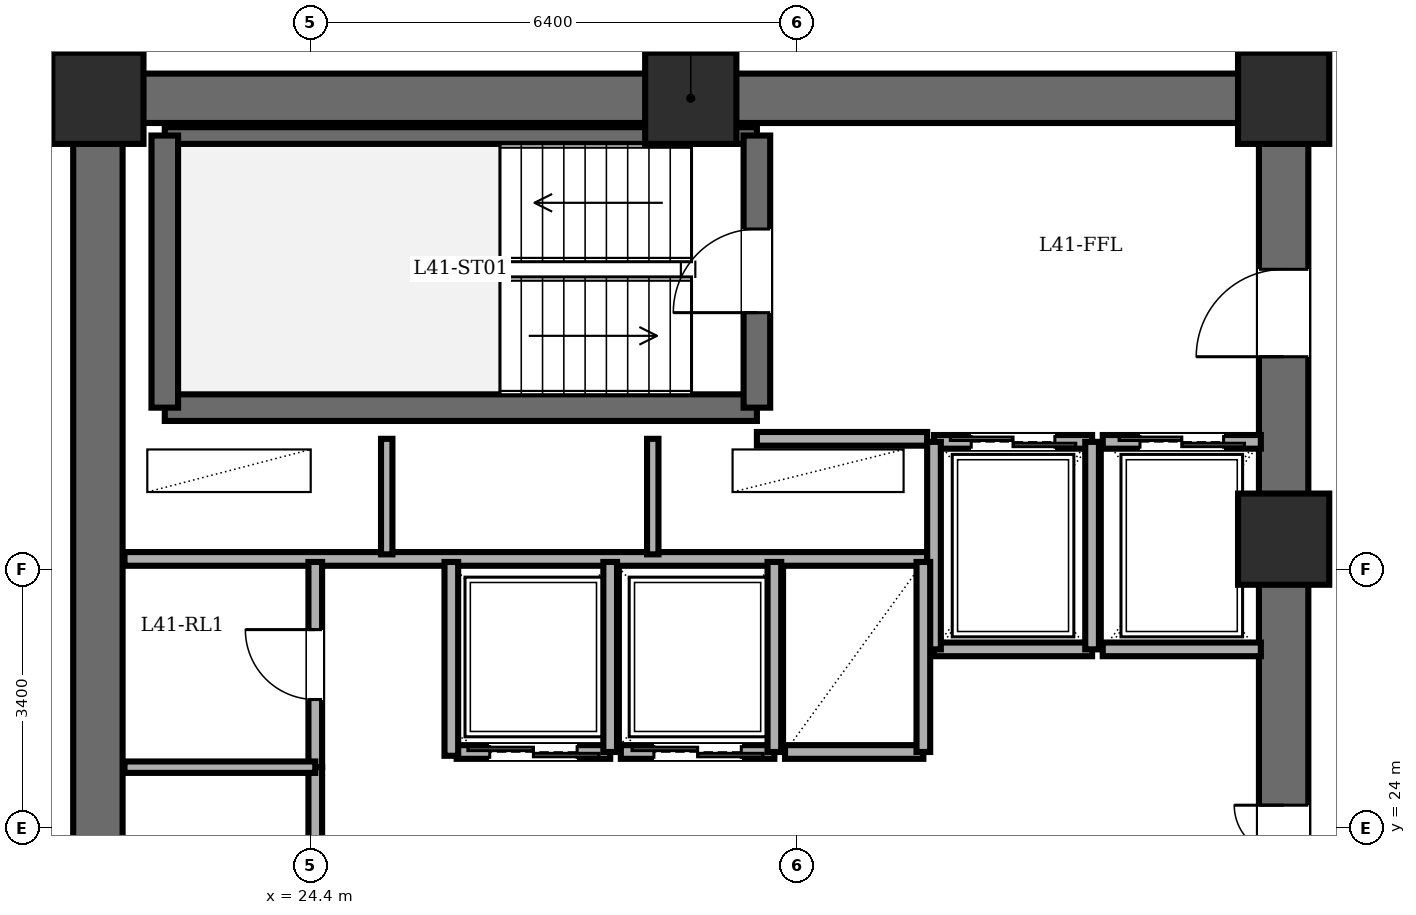
"""IFC4 building model, lengths in metres.
Left out: names, types, materials, properties, quantities, classifications, styles, units other than length and angle.
Written with IfcOpenShell. Run it as: python <this file> out.ifc"""

import sys

from ifc_helpers import new_model, si_unit, direction, frame, frame_2d, origin, origin_2d, place, context, subcontext, project, spatial, rectangle, extrude, element, fill, save


model = new_model("IFC4")
c1 = context("Model", 3, precision=1e-05, world=origin(), true_north=direction((0.0, 1.0)))
c2 = subcontext(c1, "Body", "Model", "MODEL_VIEW")
j1 = project(units=[si_unit("LENGTHUNIT", "METRE"), si_unit("PLANEANGLEUNIT", "RADIAN")], contexts=[c1])
p1 = place(None, origin())
s1 = spatial("IfcSite", under=j1, at=p1, CompositionType="ELEMENT")
p2 = place(p1, origin())
s2 = spatial("IfcBuilding", under=s1, at=p2, CompositionType="ELEMENT")
p3 = place(p2, frame((0.0, 0.0, 158.2)))
s3 = spatial("IfcBuildingStorey", under=s2, at=p3, CompositionType="ELEMENT", Elevation=158.2)
for number, where, z_axis, x_axis in (
    (1, (37.2, 27.8, 0.0), (0.0, 0.0, 1.0), (1.0, 0.0, 0.0)),
    (2, (37.2, 33.6, 0.0), (0.0, 0.0, 1.0), (1.0, 0.0, 0.0)),
    (3, (29.4, 33.6, 0.0), (0.0, 0.0, 1.0), (1.0, 0.0, 0.0)),
    (4, (21.6, 33.6, 0.0), (0.0, 0.0, 1.0), (1.0, 0.0, 0.0)),
):
    element("IfcColumn", number, at=place(p3, frame(where, z_axis=z_axis, x_axis=x_axis)), inside=s3, PredefinedType="COLUMN", context=c2, shape_type="SweptSolid", body=[
        extrude(rectangle(XDim=1.2, YDim=1.2, at=origin_2d()), origin(), (0.0, 0.0, 1.0), 3.6),
    ])
p4 = place(p3, frame((21.6, 14.4, 0.0), z_axis=(0.0, 0.0, 1.0), x_axis=(0.0, 1.0, 0.0)))
e5 = element("IfcWall", 5, at=p4, inside=s3, PredefinedType="SHEAR", context=c2, shape_type="SweptSolid", body=[
    extrude(rectangle(XDim=19.2, YDim=0.65, at=frame_2d((9.6, 0.0))), origin(), (0.0, 0.0, 1.0), 3.4),
])
p5 = place(p3, frame((21.6, 33.6, 0.0), z_axis=(0.0, 0.0, 1.0), x_axis=(1.0, 0.0, 0.0)))
e6 = element("IfcWall", 6, at=p5, inside=s3, PredefinedType="SHEAR", context=c2, shape_type="SweptSolid", body=[
    extrude(rectangle(XDim=15.6, YDim=0.65, at=frame_2d((7.8, 0.0))), origin(), (0.0, 0.0, 1.0), 3.4),
])
p6 = place(p3, frame((37.2, 14.4, 0.0), z_axis=(0.0, 0.0, 1.0), x_axis=(0.0, 1.0, 0.0)))
e7 = element("IfcWall", 7, at=p6, inside=s3, PredefinedType="SHEAR", context=c2, shape_type="SweptSolid", body=[
    extrude(rectangle(XDim=19.2, YDim=0.65, at=frame_2d((9.6, 0.0))), origin(), (0.0, 0.0, 1.0), 3.4),
])
p7 = place(p6, frame((15.8, 0.0, 0.0)))
e8 = element("IfcOpeningElement", 8, at=p7, cuts=e7, PredefinedType="OPENING", context=c2, shape_type="SweptSolid", body=[
    extrude(rectangle(XDim=1.15, YDim=2.15, at=frame_2d((0.575, 1.075))), frame((0.0, 0.335, 0.0), z_axis=(0.0, -1.0, 0.0), x_axis=(1.0, 0.0, 0.0)), (0.0, 0.0, 1.0), 0.67),
])
p8 = place(p6, frame((3.6, 0.0, 0.0)))
e9 = element("IfcOpeningElement", 9, at=p8, cuts=e7, PredefinedType="OPENING", context=c2, shape_type="SweptSolid", body=[
    extrude(rectangle(XDim=1.1, YDim=2.15, at=frame_2d((0.55, 1.075))), frame((0.0, 0.335, 0.0), z_axis=(0.0, -1.0, 0.0), x_axis=(1.0, 0.0, 0.0)), (0.0, 0.0, 1.0), 0.67),
])
p9 = place(p6, frame((8.6, 0.0, 0.0)))
e10 = element("IfcOpeningElement", 10, at=p9, cuts=e7, PredefinedType="OPENING", context=c2, shape_type="SweptSolid", body=[
    extrude(rectangle(XDim=1.3, YDim=2.2, at=frame_2d((0.65, 1.1))), frame((0.0, 0.335, 0.0), z_axis=(0.0, -1.0, 0.0), x_axis=(1.0, 0.0, 0.0)), (0.0, 0.0, 1.0), 0.67),
])
p10 = place(p3, frame((22.48, 29.53, 0.0), z_axis=(0.0, 0.0, 1.0), x_axis=(1.0, 0.0, 0.0)))
e11 = element("IfcWall", 11, at=p10, inside=s3, PredefinedType="SOLIDWALL", context=c2, shape_type="SweptSolid", body=[
    extrude(rectangle(XDim=7.79, YDim=0.35, at=frame_2d((3.895, 0.0))), origin(), (0.0, 0.0, 1.0), 3.4),
])
p11 = place(p3, frame((22.48, 33.11, 0.0), z_axis=(0.0, 0.0, 1.0), x_axis=(1.0, 0.0, 0.0)))
e12 = element("IfcWall", 12, at=p11, inside=s3, PredefinedType="PARTITIONING", context=c2, shape_type="SweptSolid", body=[
    extrude(rectangle(XDim=7.79, YDim=0.22, at=frame_2d((3.895, 0.0))), origin(), (0.0, 0.0, 1.0), 3.4),
])
p12 = place(p3, frame((22.48, 29.53, 0.0), z_axis=(0.0, 0.0, 1.0), x_axis=(0.0, 1.0, 0.0)))
e13 = element("IfcWall", 13, at=p12, inside=s3, PredefinedType="SOLIDWALL", context=c2, shape_type="SweptSolid", body=[
    extrude(rectangle(XDim=3.58, YDim=0.35, at=frame_2d((1.79, 0.0))), origin(), (0.0, 0.0, 1.0), 3.4),
])
p13 = place(p3, frame((30.27, 29.53, 0.0), z_axis=(0.0, 0.0, 1.0), x_axis=(0.0, 1.0, 0.0)))
e14 = element("IfcWall", 14, at=p13, inside=s3, PredefinedType="SOLIDWALL", context=c2, shape_type="SweptSolid", body=[
    extrude(rectangle(XDim=3.58, YDim=0.35, at=frame_2d((1.79, 0.0))), origin(), (0.0, 0.0, 1.0), 3.4),
])
p14 = place(p13, frame((1.25, 0.0, 0.0)))
e15 = element("IfcOpeningElement", 15, at=p14, cuts=e14, PredefinedType="OPENING", context=c2, shape_type="SweptSolid", body=[
    extrude(rectangle(XDim=1.1, YDim=2.15, at=frame_2d((0.55, 1.075))), frame((0.0, 0.185, 0.0), z_axis=(0.0, -1.0, 0.0), x_axis=(1.0, 0.0, 0.0)), (0.0, 0.0, 1.0), 0.37),
])
p15 = place(p3, frame((30.27, 29.12, 0.0), z_axis=(0.0, 0.0, 1.0), x_axis=(1.0, 0.0, 0.0)))
e16 = element("IfcWall", 16, at=p15, inside=s3, PredefinedType="PARTITIONING", context=c2, shape_type="SweptSolid", body=[
    extrude(rectangle(XDim=2.24, YDim=0.18, at=frame_2d((1.12, 0.0))), origin(), (0.0, 0.0, 1.0), 3.4),
])
p16 = place(p3, frame((21.95, 27.54, 0.0), z_axis=(0.0, 0.0, 1.0), x_axis=(1.0, 0.0, 0.0)))
e17 = element("IfcWall", 17, at=p16, inside=s3, PredefinedType="PARTITIONING", context=c2, shape_type="SweptSolid", body=[
    extrude(rectangle(XDim=10.56, YDim=0.18, at=frame_2d((5.28, 0.0))), origin(), (0.0, 0.0, 1.0), 3.4),
])
for number, where, z_axis, x_axis in (
    (18, (25.4, 27.6, 0.0), (0.0, 0.0, 1.0), (0.0, 1.0, 0.0)),
    (19, (28.9, 27.6, 0.0), (0.0, 0.0, 1.0), (0.0, 1.0, 0.0)),
):
    element("IfcWall", number, at=place(p3, frame(where, z_axis=z_axis, x_axis=x_axis)), inside=s3, PredefinedType="PARTITIONING", context=c2, shape_type="SweptSolid", body=[
        extrude(rectangle(XDim=1.52, YDim=0.15, at=frame_2d((0.76, 0.0))), origin(), (0.0, 0.0, 1.0), 3.4),
    ])
p17 = place(p3, frame((32.6, 29.08, 0.0), z_axis=(0.0, 0.0, 1.0), x_axis=(1.0, 0.0, 0.0)))
e20 = element("IfcWall", 20, at=p17, inside=s3, PredefinedType="PARTITIONING", context=c2, shape_type="SweptSolid", body=[
    extrude(rectangle(XDim=2.08, YDim=0.18, at=frame_2d((1.04, 0.0))), origin(), (0.0, 0.0, 1.0), 3.4),
])
p18 = place(p17, frame((0.49, 0.0, 0.0)))
e21 = element("IfcOpeningElement", 21, at=p18, cuts=e20, PredefinedType="OPENING", context=c2, shape_type="SweptSolid", body=[
    extrude(rectangle(XDim=1.1, YDim=2.2, at=frame_2d((0.55, 1.1))), frame((0.0, 0.1, 0.0), z_axis=(0.0, -1.0, 0.0), x_axis=(1.0, 0.0, 0.0)), (0.0, 0.0, 1.0), 0.2),
])
p19 = place(p3, frame((34.68, 26.35, 0.0), z_axis=(0.0, 0.0, 1.0), x_axis=(-1.0, 0.0, 0.0)))
e22 = element("IfcWall", 22, at=p19, inside=s3, PredefinedType="PARTITIONING", context=c2, shape_type="SweptSolid", body=[
    extrude(rectangle(XDim=2.08, YDim=0.18, at=frame_2d((1.04, 0.0))), origin(), (0.0, 0.0, 1.0), 3.4),
])
for number, where, z_axis, x_axis in (
    (23, (34.68, 26.35, 0.0), (0.0, 0.0, 1.0), (0.0, 1.0, 0.0)),
    (24, (32.6, 29.08, 0.0), (0.0, 0.0, 1.0), (0.0, -1.0, 0.0)),
):
    element("IfcWall", number, at=place(p3, frame(where, z_axis=z_axis, x_axis=x_axis)), inside=s3, PredefinedType="PARTITIONING", context=c2, shape_type="SweptSolid", body=[
        extrude(rectangle(XDim=2.73, YDim=0.18, at=frame_2d((1.365, 0.0))), origin(), (0.0, 0.0, 1.0), 3.4),
    ])
p20 = place(p3, frame((34.82, 29.08, 0.0), z_axis=(0.0, 0.0, 1.0), x_axis=(1.0, 0.0, 0.0)))
e25 = element("IfcWall", 25, at=p20, inside=s3, PredefinedType="PARTITIONING", context=c2, shape_type="SweptSolid", body=[
    extrude(rectangle(XDim=2.08, YDim=0.18, at=frame_2d((1.04, 0.0))), origin(), (0.0, 0.0, 1.0), 3.4),
])
p21 = place(p20, frame((0.49, 0.0, 0.0)))
e26 = element("IfcOpeningElement", 26, at=p21, cuts=e25, PredefinedType="OPENING", context=c2, shape_type="SweptSolid", body=[
    extrude(rectangle(XDim=1.1, YDim=2.2, at=frame_2d((0.55, 1.1))), frame((0.0, 0.1, 0.0), z_axis=(0.0, -1.0, 0.0), x_axis=(1.0, 0.0, 0.0)), (0.0, 0.0, 1.0), 0.2),
])
p22 = place(p3, frame((36.9, 26.35, 0.0), z_axis=(0.0, 0.0, 1.0), x_axis=(-1.0, 0.0, 0.0)))
e27 = element("IfcWall", 27, at=p22, inside=s3, PredefinedType="PARTITIONING", context=c2, shape_type="SweptSolid", body=[
    extrude(rectangle(XDim=2.08, YDim=0.18, at=frame_2d((1.04, 0.0))), origin(), (0.0, 0.0, 1.0), 3.4),
])
p23 = place(p3, frame((28.34, 25.0, 0.0), z_axis=(0.0, 0.0, 1.0), x_axis=(-1.0, 0.0, 0.0)))
e28 = element("IfcWall", 28, at=p23, inside=s3, PredefinedType="PARTITIONING", context=c2, shape_type="SweptSolid", body=[
    extrude(rectangle(XDim=2.02, YDim=0.18, at=frame_2d((1.01, 0.0))), origin(), (0.0, 0.0, 1.0), 3.4),
])
p24 = place(p23, frame((0.435, 0.0, 0.0)))
e29 = element("IfcOpeningElement", 29, at=p24, cuts=e28, PredefinedType="OPENING", context=c2, shape_type="SweptSolid", body=[
    extrude(rectangle(XDim=1.15, YDim=2.2, at=frame_2d((0.575, 1.1))), frame((0.0, 0.1, 0.0), z_axis=(0.0, -1.0, 0.0), x_axis=(1.0, 0.0, 0.0)), (0.0, 0.0, 1.0), 0.2),
])
p25 = place(p3, frame((28.34, 25.0, 0.0), z_axis=(0.0, 0.0, 1.0), x_axis=(0.0, 1.0, 0.0)))
e30 = element("IfcWall", 30, at=p25, inside=s3, PredefinedType="PARTITIONING", context=c2, shape_type="SweptSolid", body=[
    extrude(rectangle(XDim=2.5, YDim=0.18, at=frame_2d((1.25, 0.0))), origin(), (0.0, 0.0, 1.0), 3.4),
])
p26 = place(p3, frame((30.5, 25.0, 0.0), z_axis=(0.0, 0.0, 1.0), x_axis=(-1.0, 0.0, 0.0)))
e31 = element("IfcWall", 31, at=p26, inside=s3, PredefinedType="PARTITIONING", context=c2, shape_type="SweptSolid", body=[
    extrude(rectangle(XDim=2.02, YDim=0.18, at=frame_2d((1.01, 0.0))), origin(), (0.0, 0.0, 1.0), 3.4),
])
p27 = place(p26, frame((0.435, 0.0, 0.0)))
e32 = element("IfcOpeningElement", 32, at=p27, cuts=e31, PredefinedType="OPENING", context=c2, shape_type="SweptSolid", body=[
    extrude(rectangle(XDim=1.15, YDim=2.2, at=frame_2d((0.575, 1.1))), frame((0.0, 0.1, 0.0), z_axis=(0.0, -1.0, 0.0), x_axis=(1.0, 0.0, 0.0)), (0.0, 0.0, 1.0), 0.2),
])
p28 = place(p3, frame((30.5, 25.0, 0.0), z_axis=(0.0, 0.0, 1.0), x_axis=(0.0, 1.0, 0.0)))
e33 = element("IfcWall", 33, at=p28, inside=s3, PredefinedType="PARTITIONING", context=c2, shape_type="SweptSolid", body=[
    extrude(rectangle(XDim=2.5, YDim=0.18, at=frame_2d((1.25, 0.0))), origin(), (0.0, 0.0, 1.0), 3.4),
])
p29 = place(p3, frame((32.46, 25.0, 0.0), z_axis=(0.0, 0.0, 1.0), x_axis=(-1.0, 0.0, 0.0)))
e34 = element("IfcWall", 34, at=p29, inside=s3, PredefinedType="PARTITIONING", context=c2, shape_type="SweptSolid", body=[
    extrude(rectangle(XDim=1.82, YDim=0.18, at=frame_2d((0.91, 0.0))), origin(), (0.0, 0.0, 1.0), 3.4),
])
p30 = place(p3, frame((32.46, 25.0, 0.0), z_axis=(0.0, 0.0, 1.0), x_axis=(0.0, 1.0, 0.0)))
e35 = element("IfcWall", 35, at=p30, inside=s3, PredefinedType="PARTITIONING", context=c2, shape_type="SweptSolid", body=[
    extrude(rectangle(XDim=2.5, YDim=0.18, at=frame_2d((1.25, 0.0))), origin(), (0.0, 0.0, 1.0), 3.4),
])
p31 = place(p3, frame((24.46, 24.8, 0.0), z_axis=(0.0, 0.0, 1.0), x_axis=(0.0, 1.0, 0.0)))
e36 = element("IfcWall", 36, at=p31, inside=s3, PredefinedType="PARTITIONING", context=c2, shape_type="SweptSolid", body=[
    extrude(rectangle(XDim=2.7, YDim=0.18, at=frame_2d((1.35, 0.0))), origin(), (0.0, 0.0, 1.0), 3.4),
])
p32 = place(p31, frame((0.89, 0.0, 0.0)))
e37 = element("IfcOpeningElement", 37, at=p32, cuts=e36, PredefinedType="OPENING", context=c2, shape_type="SweptSolid", body=[
    extrude(rectangle(XDim=0.92, YDim=2.1, at=frame_2d((0.46, 1.05))), frame((0.0, 0.1, 0.0), z_axis=(0.0, -1.0, 0.0), x_axis=(1.0, 0.0, 0.0)), (0.0, 0.0, 1.0), 0.2),
])
p33 = place(p3, frame((24.46, 19.8, 0.0), z_axis=(0.0, 0.0, 1.0), x_axis=(0.0, 1.0, 0.0)))
e38 = element("IfcWall", 38, at=p33, inside=s3, PredefinedType="PARTITIONING", context=c2, shape_type="SweptSolid", body=[
    extrude(rectangle(XDim=5.0, YDim=0.18, at=frame_2d((2.5, 0.0))), origin(), (0.0, 0.0, 1.0), 3.4),
])
p34 = place(p33, frame((2.04, 0.0, 0.0)))
e39 = element("IfcOpeningElement", 39, at=p34, cuts=e38, PredefinedType="OPENING", context=c2, shape_type="SweptSolid", body=[
    extrude(rectangle(XDim=0.92, YDim=2.1, at=frame_2d((0.46, 1.05))), frame((0.0, 0.1, 0.0), z_axis=(0.0, -1.0, 0.0), x_axis=(1.0, 0.0, 0.0)), (0.0, 0.0, 1.0), 0.2),
])
p35 = place(p3, frame((21.95, 24.8, 0.0), z_axis=(0.0, 0.0, 1.0), x_axis=(1.0, 0.0, 0.0)))
e40 = element("IfcWall", 40, at=p35, inside=s3, PredefinedType="PARTITIONING", context=c2, shape_type="SweptSolid", body=[
    extrude(rectangle(XDim=2.51, YDim=0.15, at=frame_2d((1.255, 0.0))), origin(), (0.0, 0.0, 1.0), 3.4),
])
p36 = place(p3, frame((26.25, 24.95, 0.0), z_axis=(0.0, 0.0, 1.0), x_axis=(0.0, 1.0, 0.0)))
e41 = element("IfcWall", 41, at=p36, inside=s3, PredefinedType="PARTITIONING", context=c2, shape_type="SweptSolid", body=[
    extrude(rectangle(XDim=2.55, YDim=0.18, at=frame_2d((1.275, 0.0))), origin(), (0.0, 0.0, 1.0), 3.4),
])
p37 = place(p3, frame((13.8, 33.82, 0.0), z_axis=(0.0, 0.0, 1.0), x_axis=(1.0, 0.0, 0.0)))
e42 = element("IfcWall", 42, at=p37, inside=s3, PredefinedType="PARTITIONING", context=c2, shape_type="SweptSolid", body=[
    extrude(rectangle(XDim=7.68, YDim=0.18, at=frame_2d((3.84, 0.0))), origin(), (0.0, 0.0, 1.0), 3.4),
])
p38 = place(p14, origin())
e43 = element("IfcDoor", 43, at=p38, inside=s3, OperationType="SINGLE_SWING_LEFT", PredefinedType="DOOR", context=c2, shape_type="SweptSolid", body=[
    extrude(rectangle(XDim=1.1, YDim=2.15, at=frame_2d((0.55, 1.075))), frame((0.0, 0.025, 0.0), z_axis=(0.0, -1.0, 0.0), x_axis=(1.0, 0.0, 0.0)), (0.0, 0.0, 1.0), 0.05),
])
fill(e15, e43)
p39 = place(p7, origin())
e44 = element("IfcDoor", 44, at=p39, inside=s3, OperationType="SINGLE_SWING_LEFT", PredefinedType="DOOR", context=c2, shape_type="SweptSolid", body=[
    extrude(rectangle(XDim=1.15, YDim=2.15, at=frame_2d((0.575, 1.075))), frame((0.0, 0.025, 0.0), z_axis=(0.0, -1.0, 0.0), x_axis=(1.0, 0.0, 0.0)), (0.0, 0.0, 1.0), 0.05),
])
fill(e8, e44)
p40 = place(p18, origin())
e45 = element("IfcDoor", 45, at=p40, inside=s3, OperationType="DOUBLE_DOOR_SLIDING", PredefinedType="DOOR", context=c2, shape_type="SweptSolid", body=[
    extrude(rectangle(XDim=1.1, YDim=2.2, at=frame_2d((0.55, 1.1))), frame((0.0, 0.025, 0.0), z_axis=(0.0, -1.0, 0.0), x_axis=(1.0, 0.0, 0.0)), (0.0, 0.0, 1.0), 0.05),
])
fill(e21, e45)
p41 = place(p21, origin())
e46 = element("IfcDoor", 46, at=p41, inside=s3, OperationType="DOUBLE_DOOR_SLIDING", PredefinedType="DOOR", context=c2, shape_type="SweptSolid", body=[
    extrude(rectangle(XDim=1.1, YDim=2.2, at=frame_2d((0.55, 1.1))), frame((0.0, 0.025, 0.0), z_axis=(0.0, -1.0, 0.0), x_axis=(1.0, 0.0, 0.0)), (0.0, 0.0, 1.0), 0.05),
])
fill(e26, e46)
p42 = place(p24, origin())
e47 = element("IfcDoor", 47, at=p42, inside=s3, OperationType="DOUBLE_DOOR_SLIDING", PredefinedType="DOOR", context=c2, shape_type="SweptSolid", body=[
    extrude(rectangle(XDim=1.15, YDim=2.2, at=frame_2d((0.575, 1.1))), frame((0.0, 0.025, 0.0), z_axis=(0.0, -1.0, 0.0), x_axis=(1.0, 0.0, 0.0)), (0.0, 0.0, 1.0), 0.05),
])
fill(e29, e47)
p43 = place(p27, origin())
e48 = element("IfcDoor", 48, at=p43, inside=s3, OperationType="DOUBLE_DOOR_SLIDING", PredefinedType="DOOR", context=c2, shape_type="SweptSolid", body=[
    extrude(rectangle(XDim=1.15, YDim=2.2, at=frame_2d((0.575, 1.1))), frame((0.0, 0.025, 0.0), z_axis=(0.0, -1.0, 0.0), x_axis=(1.0, 0.0, 0.0)), (0.0, 0.0, 1.0), 0.05),
])
fill(e32, e48)
p44 = place(p32, origin())
e49 = element("IfcDoor", 49, at=p44, inside=s3, OperationType="SINGLE_SWING_RIGHT", PredefinedType="DOOR", context=c2, shape_type="SweptSolid", body=[
    extrude(rectangle(XDim=0.92, YDim=2.1, at=frame_2d((0.46, 1.05))), frame((0.0, 0.025, 0.0), z_axis=(0.0, -1.0, 0.0), x_axis=(1.0, 0.0, 0.0)), (0.0, 0.0, 1.0), 0.05),
])
fill(e37, e49)
p45 = place(p9, origin())
e50 = element("IfcDoor", 50, at=p45, inside=s3, OperationType="DOUBLE_DOOR_SINGLE_SWING", PredefinedType="DOOR", context=c2, shape_type="SweptSolid", body=[
    extrude(rectangle(XDim=1.3, YDim=2.2, at=frame_2d((0.65, 1.1))), frame((0.0, 0.025, 0.0), z_axis=(0.0, -1.0, 0.0), x_axis=(1.0, 0.0, 0.0)), (0.0, 0.0, 1.0), 0.05),
])
fill(e10, e50)
save(model, sys.argv[1])
